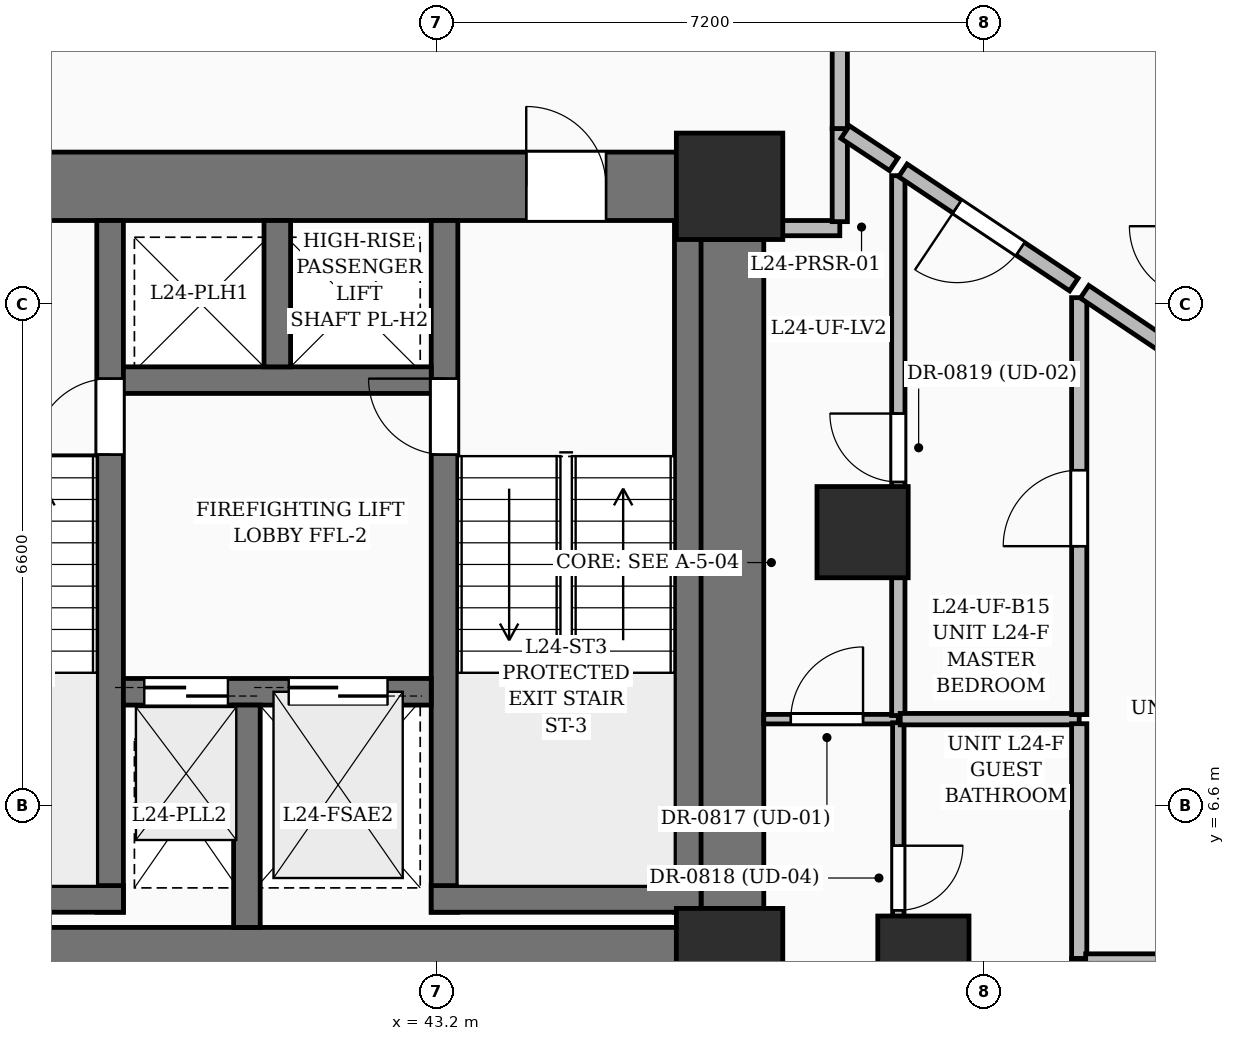
"""IFC4 building model, lengths in metres.
Left out: names, types, materials, properties, quantities, classifications, styles, units other than length and angle.
Written with IfcOpenShell. Run it as: python <this file> out.ifc"""

import sys

from ifc_helpers import new_model, si_unit, direction, frame, frame_2d, origin, origin_2d, place, context, subcontext, project, spatial, rectangle, extrude, element, fill, save


model = new_model("IFC4")
c1 = context("Model", 3, precision=1e-05, world=origin(), true_north=direction((0.0, 1.0)))
c2 = subcontext(c1, "Body", "Model", "MODEL_VIEW")
j1 = project(units=[si_unit("LENGTHUNIT", "METRE"), si_unit("PLANEANGLEUNIT", "RADIAN")], contexts=[c1])
p1 = place(None, origin())
s1 = spatial("IfcSite", under=j1, at=p1, CompositionType="ELEMENT")
p2 = place(p1, origin())
s2 = spatial("IfcBuilding", under=s1, at=p2, CompositionType="ELEMENT")
p3 = place(p2, frame((0.0, 0.0, 96.6)))
s3 = spatial("IfcBuildingStorey", under=s2, at=p3, CompositionType="ELEMENT", Elevation=96.6)
for number, where, z_axis, x_axis in (
    (1, (47.05, 4.55, 0.0), (0.0, 0.0, 1.0), (1.0, 0.0, 0.0)),
    (2, (47.05, 14.75, 0.0), (0.0, 0.0, 1.0), (1.0, 0.0, 0.0)),
):
    element("IfcColumn", number, at=place(p3, frame(where, z_axis=z_axis, x_axis=x_axis)), inside=s3, PredefinedType="COLUMN", context=c2, shape_type="SweptSolid", body=[
        extrude(rectangle(XDim=1.4, YDim=1.4, at=origin_2d()), origin(), (0.0, 0.0, 1.0), 3.6),
    ])
for number, where, z_axis, x_axis in (
    (3, (49.6, 4.55, 0.0), (0.0, 0.0, 1.0), (1.0, 0.0, 0.0)),
    (4, (48.8, 10.2, 0.0), (0.0, 0.0, 1.0), (1.0, 0.0, 0.0)),
):
    element("IfcColumn", number, at=place(p3, frame(where, z_axis=z_axis, x_axis=x_axis)), inside=s3, PredefinedType="COLUMN", context=c2, shape_type="SweptSolid", body=[
        extrude(rectangle(XDim=1.2, YDim=1.2, at=origin_2d()), origin(), (0.0, 0.0, 1.0), 3.6),
    ])
p4 = place(p3, frame((35.85, 4.55, 0.0), z_axis=(0.0, 0.0, 1.0), x_axis=(1.0, 0.0, 0.0)))
e5 = element("IfcWall", 5, at=p4, inside=s3, PredefinedType="SHEAR", context=c2, shape_type="SweptSolid", body=[
    extrude(rectangle(XDim=10.5, YDim=0.9, at=frame_2d((5.25, 0.0))), origin(), (0.0, 0.0, 1.0), 3.6),
])
p5 = place(p3, frame((35.85, 14.75, 0.0), z_axis=(0.0, 0.0, 1.0), x_axis=(1.0, 0.0, 0.0)))
e6 = element("IfcWall", 6, at=p5, inside=s3, PredefinedType="SHEAR", context=c2, shape_type="SweptSolid", body=[
    extrude(rectangle(XDim=10.5, YDim=0.9, at=frame_2d((5.25, 0.0))), origin(), (0.0, 0.0, 1.0), 3.6),
])
p6 = place(p5, frame((0.925, 0.0, 0.0)))
e7 = element("IfcOpeningElement", 7, at=p6, cuts=e6, PredefinedType="OPENING", context=c2, shape_type="SweptSolid", body=[
    extrude(rectangle(XDim=1.05, YDim=2.15, at=frame_2d((0.525, 1.075))), frame((0.0, 0.46, 0.0), z_axis=(0.0, -1.0, 0.0), x_axis=(1.0, 0.0, 0.0)), (0.0, 0.0, 1.0), 0.92),
])
p7 = place(p5, frame((8.525, 0.0, 0.0)))
e8 = element("IfcOpeningElement", 8, at=p7, cuts=e6, PredefinedType="OPENING", context=c2, shape_type="SweptSolid", body=[
    extrude(rectangle(XDim=1.05, YDim=2.15, at=frame_2d((0.525, 1.075))), frame((0.0, 0.46, 0.0), z_axis=(0.0, -1.0, 0.0), x_axis=(1.0, 0.0, 0.0)), (0.0, 0.0, 1.0), 0.92),
])
p8 = place(p3, frame((47.05, 5.25, 0.0), z_axis=(0.0, 0.0, 1.0), x_axis=(0.0, 1.0, 0.0)))
e9 = element("IfcWall", 9, at=p8, inside=s3, PredefinedType="SHEAR", context=c2, shape_type="SweptSolid", body=[
    extrude(rectangle(XDim=8.8, YDim=0.9, at=frame_2d((4.4, 0.0))), origin(), (0.0, 0.0, 1.0), 3.6),
])
p9 = place(p3, frame((38.9, 5.2, 0.0), z_axis=(0.0, 0.0, 1.0), x_axis=(0.0, 1.0, 0.0)))
e10 = element("IfcWall", 10, at=p9, inside=s3, PredefinedType="SOLIDWALL", context=c2, shape_type="SweptSolid", body=[
    extrude(rectangle(XDim=9.1, YDim=0.35, at=frame_2d((4.55, 0.0))), origin(), (0.0, 0.0, 1.0), 3.6),
])
p10 = place(p9, frame((6.02, 0.0, 0.0)))
e11 = element("IfcOpeningElement", 11, at=p10, cuts=e10, PredefinedType="OPENING", context=c2, shape_type="SweptSolid", body=[
    extrude(rectangle(XDim=1.0, YDim=2.15, at=frame_2d((0.5, 1.075))), frame((0.0, 0.185, 0.0), z_axis=(0.0, -1.0, 0.0), x_axis=(1.0, 0.0, 0.0)), (0.0, 0.0, 1.0), 0.37),
])
p11 = place(p3, frame((35.525, 5.375, 0.0), z_axis=(0.0, 0.0, 1.0), x_axis=(1.0, 0.0, 0.0)))
e12 = element("IfcWall", 12, at=p11, inside=s3, PredefinedType="SOLIDWALL", context=c2, shape_type="SweptSolid", body=[
    extrude(rectangle(XDim=3.55, YDim=0.35, at=frame_2d((1.775, 0.0))), origin(), (0.0, 0.0, 1.0), 3.6),
])
p12 = place(p3, frame((43.3, 5.2, 0.0), z_axis=(0.0, 0.0, 1.0), x_axis=(0.0, 1.0, 0.0)))
e13 = element("IfcWall", 13, at=p12, inside=s3, PredefinedType="SOLIDWALL", context=c2, shape_type="SweptSolid", body=[
    extrude(rectangle(XDim=9.1, YDim=0.35, at=frame_2d((4.55, 0.0))), origin(), (0.0, 0.0, 1.0), 3.6),
])
p13 = place(p12, frame((6.02, 0.0, 0.0)))
e14 = element("IfcOpeningElement", 14, at=p13, cuts=e13, PredefinedType="OPENING", context=c2, shape_type="SweptSolid", body=[
    extrude(rectangle(XDim=1.0, YDim=2.15, at=frame_2d((0.5, 1.075))), frame((0.0, 0.185, 0.0), z_axis=(0.0, -1.0, 0.0), x_axis=(1.0, 0.0, 0.0)), (0.0, 0.0, 1.0), 0.37),
])
p14 = place(p3, frame((46.5, 5.2, 0.0), z_axis=(0.0, 0.0, 1.0), x_axis=(0.0, 1.0, 0.0)))
e15 = element("IfcWall", 15, at=p14, inside=s3, PredefinedType="SOLIDWALL", context=c2, shape_type="SweptSolid", body=[
    extrude(rectangle(XDim=9.1, YDim=0.35, at=frame_2d((4.55, 0.0))), origin(), (0.0, 0.0, 1.0), 3.6),
])
p15 = place(p3, frame((43.125, 5.375, 0.0), z_axis=(0.0, 0.0, 1.0), x_axis=(1.0, 0.0, 0.0)))
e16 = element("IfcWall", 16, at=p15, inside=s3, PredefinedType="SOLIDWALL", context=c2, shape_type="SweptSolid", body=[
    extrude(rectangle(XDim=3.55, YDim=0.35, at=frame_2d((1.775, 0.0))), origin(), (0.0, 0.0, 1.0), 3.6),
])
p16 = place(p3, frame((39.075, 8.1, 0.0), z_axis=(0.0, 0.0, 1.0), x_axis=(1.0, 0.0, 0.0)))
e17 = element("IfcWall", 17, at=p16, inside=s3, PredefinedType="SOLIDWALL", context=c2, shape_type="SweptSolid", body=[
    extrude(rectangle(XDim=4.05, YDim=0.35, at=frame_2d((2.025, 0.0))), origin(), (0.0, 0.0, 1.0), 3.6),
])
p17 = place(p16, frame((2.175, 0.0, 0.0)))
e18 = element("IfcOpeningElement", 18, at=p17, cuts=e17, PredefinedType="OPENING", context=c2, shape_type="SweptSolid", body=[
    extrude(rectangle(XDim=1.3, YDim=2.25, at=frame_2d((0.65, 1.125))), frame((0.0, 0.185, 0.0), z_axis=(0.0, -1.0, 0.0), x_axis=(1.0, 0.0, 0.0)), (0.0, 0.0, 1.0), 0.37),
])
p18 = place(p16, frame((0.275, 0.0, 0.0)))
e19 = element("IfcOpeningElement", 19, at=p18, cuts=e17, PredefinedType="OPENING", context=c2, shape_type="SweptSolid", body=[
    extrude(rectangle(XDim=1.1, YDim=2.2, at=frame_2d((0.55, 1.1))), frame((0.0, 0.185, 0.0), z_axis=(0.0, -1.0, 0.0), x_axis=(1.0, 0.0, 0.0)), (0.0, 0.0, 1.0), 0.37),
])
p19 = place(p3, frame((40.7, 5.0, 0.0), z_axis=(0.0, 0.0, 1.0), x_axis=(0.0, 1.0, 0.0)))
e20 = element("IfcWall", 20, at=p19, inside=s3, PredefinedType="SOLIDWALL", context=c2, shape_type="SweptSolid", body=[
    extrude(rectangle(XDim=2.925, YDim=0.35, at=frame_2d((1.462, 0.0))), origin(), (0.0, 0.0, 1.0), 3.6),
])
p20 = place(p3, frame((39.075, 12.2, 0.0), z_axis=(0.0, 0.0, 1.0), x_axis=(1.0, 0.0, 0.0)))
e21 = element("IfcWall", 21, at=p20, inside=s3, PredefinedType="SOLIDWALL", context=c2, shape_type="SweptSolid", body=[
    extrude(rectangle(XDim=4.05, YDim=0.35, at=frame_2d((2.025, 0.0))), origin(), (0.0, 0.0, 1.0), 3.6),
])
p21 = place(p3, frame((41.1, 12.375, 0.0), z_axis=(0.0, 0.0, 1.0), x_axis=(0.0, 1.0, 0.0)))
e22 = element("IfcWall", 22, at=p21, inside=s3, PredefinedType="SOLIDWALL", context=c2, shape_type="SweptSolid", body=[
    extrude(rectangle(XDim=1.925, YDim=0.35, at=frame_2d((0.962, 0.0))), origin(), (0.0, 0.0, 1.0), 3.6),
])
p22 = place(p3, frame((47.5, 14.2, 0.0), z_axis=(0.0, 0.0, 1.0), x_axis=(1.0, 0.0, 0.0)))
e23 = element("IfcWall", 23, at=p22, inside=s3, PredefinedType="PARTITIONING", context=c2, shape_type="SweptSolid", body=[
    extrude(rectangle(XDim=1.0, YDim=0.2, at=frame_2d((0.5, 0.0))), origin(), (0.0, 0.0, 1.0), 3.3),
])
p23 = place(p3, frame((48.5, 14.285, 0.0), z_axis=(0.0, 0.0, 1.0), x_axis=(0.0, 1.0, 0.0)))
e24 = element("IfcWall", 24, at=p23, inside=s3, PredefinedType="PARTITIONING", context=c2, shape_type="SweptSolid", body=[
    extrude(rectangle(XDim=1.225, YDim=0.2, at=frame_2d((0.613, 0.0))), origin(), (0.0, 0.0, 1.0), 3.3),
])
p24 = place(p3, frame((48.5, 15.51, 0.0), z_axis=(0.0, 0.0, 1.0), x_axis=(0.0, 1.0, 0.0)))
e25 = element("IfcWall", 25, at=p24, inside=s3, PredefinedType="PARTITIONING", context=c2, shape_type="SweptSolid", body=[
    extrude(rectangle(XDim=2.24, YDim=0.2, at=frame_2d((1.12, 0.0))), origin(), (0.0, 0.0, 1.0), 2.295),
])
p25 = place(p3, frame((47.5, 7.74, 0.0), z_axis=(0.0, 0.0, 1.0), x_axis=(1.0, 0.0, 0.0)))
e26 = element("IfcWall", 26, at=p25, inside=s3, PredefinedType="PARTITIONING", context=c2, shape_type="SweptSolid", body=[
    extrude(rectangle(XDim=1.77, YDim=0.125, at=frame_2d((0.885, 0.0))), origin(), (0.0, 0.0, 1.0), 2.259),
])
p26 = place(p25, frame((0.356, 0.0, 0.0)))
e27 = element("IfcOpeningElement", 27, at=p26, cuts=e26, PredefinedType="OPENING", context=c2, shape_type="SweptSolid", body=[
    extrude(rectangle(XDim=0.95, YDim=2.2, at=frame_2d((0.475, 1.1))), frame((0.0, 0.072, 0.0), z_axis=(0.0, -1.0, 0.0), x_axis=(1.0, 0.0, 0.0)), (0.0, 0.0, 1.0), 0.145),
])
p27 = place(p3, frame((49.27, 7.788, 0.0), z_axis=(0.0, 0.0, 1.0), x_axis=(0.0, 1.0, 0.0)))
e28 = element("IfcWall", 28, at=p27, inside=s3, PredefinedType="PARTITIONING", context=c2, shape_type="SweptSolid", body=[
    extrude(rectangle(XDim=7.102, YDim=0.175, at=frame_2d((3.551, 0.0))), origin(), (0.0, 0.0, 1.0), 2.81),
])
p28 = place(p27, frame((3.073, 0.0, 0.0)))
e29 = element("IfcOpeningElement", 29, at=p28, cuts=e28, PredefinedType="OPENING", context=c2, shape_type="SweptSolid", body=[
    extrude(rectangle(XDim=0.9, YDim=2.15, at=frame_2d((0.45, 1.075))), frame((0.0, 0.097, 0.0), z_axis=(0.0, -1.0, 0.0), x_axis=(1.0, 0.0, 0.0)), (0.0, 0.0, 1.0), 0.195),
])
p29 = place(p3, frame((49.21, 15.04, 0.0), z_axis=(0.0, 0.0, 1.0), x_axis=(-0.833761824074, 0.552124280137, 0.0)))
e30 = element("IfcWall", 30, at=p29, inside=s3, PredefinedType="PARTITIONING", context=c2, shape_type="SweptSolid", body=[
    extrude(rectangle(XDim=0.766, YDim=0.2, at=frame_2d((0.383, 0.0))), origin(), (0.0, 0.0, 1.0), 2.81),
])
p30 = place(p3, frame((49.27, 7.692, 0.0), z_axis=(0.0, 0.0, 1.0), x_axis=(0.0, -1.0, 0.0)))
e31 = element("IfcWall", 31, at=p30, inside=s3, PredefinedType="PARTITIONING", context=c2, shape_type="SweptSolid", body=[
    extrude(rectangle(XDim=5.792, YDim=0.15, at=frame_2d((2.896, 0.0))), origin(), (0.0, 0.0, 1.0), 2.32),
])
p31 = place(p30, frame((1.618, 0.0, 0.0)))
e32 = element("IfcOpeningElement", 32, at=p31, cuts=e31, PredefinedType="OPENING", context=c2, shape_type="SweptSolid", body=[
    extrude(rectangle(XDim=0.85, YDim=2.1, at=frame_2d((0.425, 1.05))), frame((0.0, 0.085, 0.0), z_axis=(0.0, -1.0, 0.0), x_axis=(1.0, 0.0, 0.0)), (0.0, 0.0, 1.0), 0.17),
])
p32 = place(p3, frame((51.65, 7.74, 0.0), z_axis=(0.0, 0.0, 1.0), x_axis=(-1.0, 0.0, 0.0)))
e33 = element("IfcWall", 33, at=p32, inside=s3, PredefinedType="PARTITIONING", context=c2, shape_type="SweptSolid", body=[
    extrude(rectangle(XDim=2.355, YDim=0.15, at=frame_2d((1.177, 0.0))), origin(), (0.0, 0.0, 1.0), 3.3),
])
p33 = place(p3, frame((51.65, 4.59, 0.0), z_axis=(0.0, 0.0, 1.0), x_axis=(0.0, 1.0, 0.0)))
e34 = element("IfcWall", 34, at=p33, inside=s3, PredefinedType="PARTITIONING", context=c2, shape_type="SweptSolid", body=[
    extrude(rectangle(XDim=3.09, YDim=0.2, at=frame_2d((1.545, 0.0))), origin(), (0.0, 0.0, 1.0), 2.81),
])
p34 = place(p3, frame((51.65, 1.9, 0.0), z_axis=(0.0, 0.0, 1.0), x_axis=(0.0, 1.0, 0.0)))
e35 = element("IfcWall", 35, at=p34, inside=s3, PredefinedType="PARTITIONING", context=c2, shape_type="SweptSolid", body=[
    extrude(rectangle(XDim=2.69, YDim=0.2, at=frame_2d((1.345, 0.0))), origin(), (0.0, 0.0, 1.0), 2.295),
])
p35 = place(p3, frame((51.65, 7.8, 0.0), z_axis=(0.0, 0.0, 1.0), x_axis=(0.0, 1.0, 0.0)))
e36 = element("IfcWall", 36, at=p35, inside=s3, PredefinedType="PARTITIONING", context=c2, shape_type="SweptSolid", body=[
    extrude(rectangle(XDim=5.485, YDim=0.2, at=frame_2d((2.742, 0.0))), origin(), (0.0, 0.0, 1.0), 2.295),
])
p36 = place(p35, frame((2.216, 0.0, 0.0)))
e37 = element("IfcOpeningElement", 37, at=p36, cuts=e36, PredefinedType="OPENING", context=c2, shape_type="SweptSolid", body=[
    extrude(rectangle(XDim=1.0, YDim=2.2, at=frame_2d((0.5, 1.1))), frame((0.0, 0.11, 0.0), z_axis=(0.0, -1.0, 0.0), x_axis=(1.0, 0.0, 0.0)), (0.0, 0.0, 1.0), 0.22),
])
p37 = place(p3, frame((51.579, 13.457, 0.0), z_axis=(0.0, 0.0, 1.0), x_axis=(-0.831522214089, 0.555491500814, 0.0)))
e38 = element("IfcWall", 38, at=p37, inside=s3, PredefinedType="PARTITIONING", context=c2, shape_type="SweptSolid", body=[
    extrude(rectangle(XDim=2.705, YDim=0.2, at=frame_2d((1.352, 0.0))), origin(), (0.0, 0.0, 1.0), 2.81),
])
p38 = place(p37, frame((0.846, 0.0, 0.0)))
e39 = element("IfcOpeningElement", 39, at=p38, cuts=e38, PredefinedType="OPENING", context=c2, shape_type="SweptSolid", body=[
    extrude(rectangle(XDim=1.0, YDim=2.2, at=frame_2d((0.5, 1.1))), frame((0.0, 0.11, 0.0), z_axis=(0.0, -1.0, 0.0), x_axis=(1.0, 0.0, 0.0)), (0.0, 0.0, 1.0), 0.22),
])
p39 = place(p3, frame((51.735, 4.59, 0.0), z_axis=(0.0, 0.0, 1.0), x_axis=(1.0, 0.0, 0.0)))
e40 = element("IfcWall", 40, at=p39, inside=s3, PredefinedType="PARTITIONING", context=c2, shape_type="SweptSolid", body=[
    extrude(rectangle(XDim=4.645, YDim=0.125, at=frame_2d((2.322, 0.0))), origin(), (0.0, 0.0, 1.0), 2.32),
])
p40 = place(p39, frame((1.805, 0.0, 0.0)))
e41 = element("IfcOpeningElement", 41, at=p40, cuts=e40, PredefinedType="OPENING", context=c2, shape_type="SweptSolid", body=[
    extrude(rectangle(XDim=0.95, YDim=2.2, at=frame_2d((0.475, 1.1))), frame((0.0, 0.072, 0.0), z_axis=(0.0, -1.0, 0.0), x_axis=(1.0, 0.0, 0.0)), (0.0, 0.0, 1.0), 0.145),
])
p41 = place(p3, frame((53.26, 12.33, 0.0), z_axis=(0.0, 0.0, 1.0), x_axis=(-0.830486641952, 0.557038542239, 0.0)))
e42 = element("IfcWall", 42, at=p41, inside=s3, PredefinedType="PARTITIONING", context=c2, shape_type="SweptSolid", body=[
    extrude(rectangle(XDim=1.854, YDim=0.2, at=frame_2d((0.927, 0.0))), origin(), (0.0, 0.0, 1.0), 2.81),
])
p42 = place(p7, origin())
e43 = element("IfcDoor", 43, at=p42, inside=s3, OperationType="SINGLE_SWING_LEFT", PredefinedType="DOOR", context=c2, shape_type="SweptSolid", body=[
    extrude(rectangle(XDim=1.05, YDim=2.15, at=frame_2d((0.525, 1.075))), frame((0.0, 0.025, 0.0), z_axis=(0.0, -1.0, 0.0), x_axis=(1.0, 0.0, 0.0)), (0.0, 0.0, 1.0), 0.05),
])
fill(e8, e43)
p43 = place(p10, origin())
e44 = element("IfcDoor", 44, at=p43, inside=s3, OperationType="SINGLE_SWING_LEFT", PredefinedType="DOOR", context=c2, shape_type="SweptSolid", body=[
    extrude(rectangle(XDim=1.0, YDim=2.15, at=frame_2d((0.5, 1.075))), frame((0.0, 0.025, 0.0), z_axis=(0.0, -1.0, 0.0), x_axis=(1.0, 0.0, 0.0)), (0.0, 0.0, 1.0), 0.05),
])
fill(e11, e44)
p44 = place(p13, origin())
e45 = element("IfcDoor", 45, at=p44, inside=s3, OperationType="SINGLE_SWING_RIGHT", PredefinedType="DOOR", context=c2, shape_type="SweptSolid", body=[
    extrude(rectangle(XDim=1.0, YDim=2.15, at=frame_2d((0.5, 1.075))), frame((0.0, 0.025, 0.0), z_axis=(0.0, -1.0, 0.0), x_axis=(1.0, 0.0, 0.0)), (0.0, 0.0, 1.0), 0.05),
])
fill(e14, e45)
p45 = place(p17, origin())
e46 = element("IfcDoor", 46, at=p45, inside=s3, OperationType="DOUBLE_DOOR_SLIDING", PredefinedType="DOOR", context=c2, shape_type="SweptSolid", body=[
    extrude(rectangle(XDim=1.3, YDim=2.25, at=frame_2d((0.65, 1.125))), frame((0.0, 0.025, 0.0), z_axis=(0.0, -1.0, 0.0), x_axis=(1.0, 0.0, 0.0)), (0.0, 0.0, 1.0), 0.05),
])
fill(e18, e46)
p46 = place(p18, origin())
e47 = element("IfcDoor", 47, at=p46, inside=s3, OperationType="DOUBLE_DOOR_SLIDING", PredefinedType="DOOR", context=c2, shape_type="SweptSolid", body=[
    extrude(rectangle(XDim=1.1, YDim=2.2, at=frame_2d((0.55, 1.1))), frame((0.0, 0.025, 0.0), z_axis=(0.0, -1.0, 0.0), x_axis=(1.0, 0.0, 0.0)), (0.0, 0.0, 1.0), 0.05),
])
fill(e19, e47)
p47 = place(p26, origin())
e48 = element("IfcDoor", 48, at=p47, inside=s3, OperationType="SINGLE_SWING_RIGHT", PredefinedType="DOOR", context=c2, shape_type="SweptSolid", body=[
    extrude(rectangle(XDim=0.95, YDim=2.2, at=frame_2d((0.475, 1.1))), frame((0.0, 0.025, 0.0), z_axis=(0.0, -1.0, 0.0), x_axis=(1.0, 0.0, 0.0)), (0.0, 0.0, 1.0), 0.05),
])
fill(e27, e48)
p48 = place(p31, origin())
e49 = element("IfcDoor", 49, at=p48, inside=s3, OperationType="SINGLE_SWING_LEFT", PredefinedType="DOOR", context=c2, shape_type="SweptSolid", body=[
    extrude(rectangle(XDim=0.85, YDim=2.1, at=frame_2d((0.425, 1.05))), frame((0.0, 0.025, 0.0), z_axis=(0.0, -1.0, 0.0), x_axis=(1.0, 0.0, 0.0)), (0.0, 0.0, 1.0), 0.05),
])
fill(e32, e49)
p49 = place(p28, origin())
e50 = element("IfcDoor", 50, at=p49, inside=s3, OperationType="SINGLE_SWING_RIGHT", PredefinedType="DOOR", context=c2, shape_type="SweptSolid", body=[
    extrude(rectangle(XDim=0.9, YDim=2.15, at=frame_2d((0.45, 1.075))), frame((0.0, 0.025, 0.0), z_axis=(0.0, -1.0, 0.0), x_axis=(1.0, 0.0, 0.0)), (0.0, 0.0, 1.0), 0.05),
])
fill(e29, e50)
p50 = place(p38, origin())
e51 = element("IfcDoor", 51, at=p50, inside=s3, OperationType="SINGLE_SWING_RIGHT", PredefinedType="DOOR", context=c2, shape_type="SweptSolid", body=[
    extrude(rectangle(XDim=1.0, YDim=2.2, at=frame_2d((0.5, 1.1))), frame((0.0, 0.025, 0.0), z_axis=(0.0, -1.0, 0.0), x_axis=(1.0, 0.0, 0.0)), (0.0, 0.0, 1.0), 0.05),
])
fill(e39, e51)
p51 = place(p36, origin())
e52 = element("IfcDoor", 52, at=p51, inside=s3, OperationType="SINGLE_SWING_LEFT", PredefinedType="DOOR", context=c2, shape_type="SweptSolid", body=[
    extrude(rectangle(XDim=1.0, YDim=2.2, at=frame_2d((0.5, 1.1))), frame((0.0, 0.025, 0.0), z_axis=(0.0, -1.0, 0.0), x_axis=(1.0, 0.0, 0.0)), (0.0, 0.0, 1.0), 0.05),
])
fill(e37, e52)
save(model, sys.argv[1])
